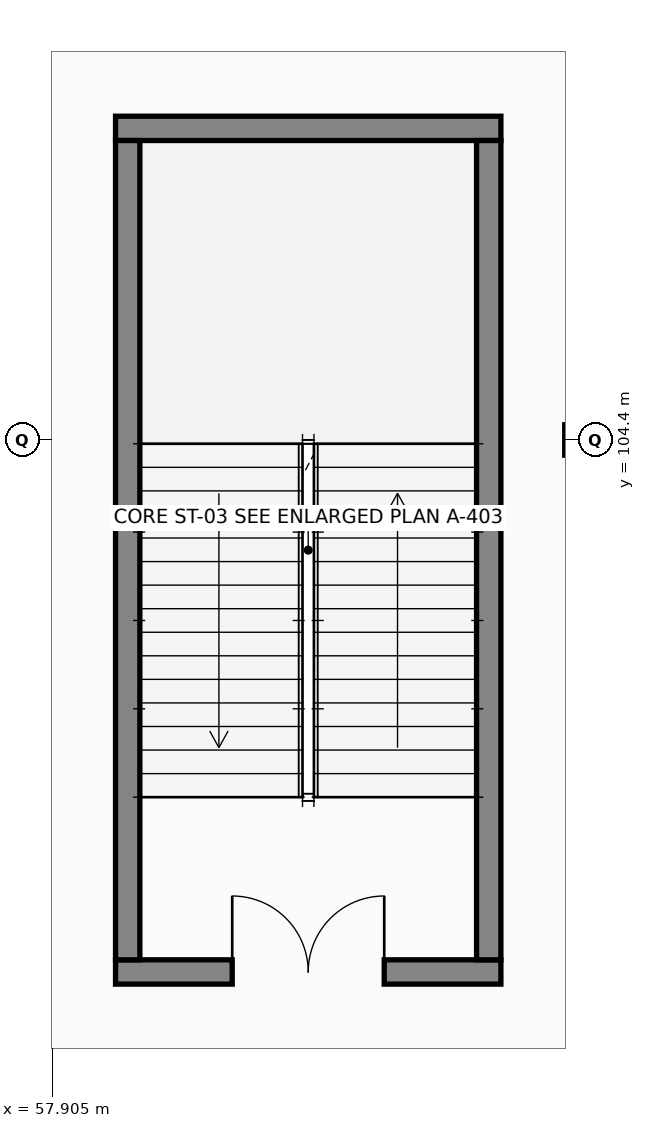
"""IFC4 building model, lengths in metres.
Left out: names, types, materials, properties, quantities, classifications, styles, units other than length and angle.
Written with IfcOpenShell. Run it as: python <this file> out.ifc"""

import sys

from ifc_helpers import new_model, si_unit, direction, frame, frame_2d, origin, place, context, subcontext, project, spatial, rectangle, extrude, element, fill, save


model = new_model("IFC4")
c1 = context("Model", 3, precision=1e-05, world=origin(), true_north=direction((0.0, 1.0)))
c2 = subcontext(c1, "Body", "Model", "MODEL_VIEW")
j1 = project(units=[si_unit("LENGTHUNIT", "METRE"), si_unit("PLANEANGLEUNIT", "RADIAN")], contexts=[c1])
p1 = place(None, origin())
s1 = spatial("IfcSite", under=j1, at=p1, CompositionType="ELEMENT")
p2 = place(p1, origin())
s2 = spatial("IfcBuilding", under=s1, at=p2, CompositionType="ELEMENT")
p3 = place(p2, frame((0.0, 0.0, 9.6)))
s3 = spatial("IfcBuildingStorey", under=s2, at=p3, CompositionType="ELEMENT", Elevation=9.6)
p4 = place(p3, frame((58.74, 97.4, 0.0), z_axis=(0.0, 0.0, 1.0), x_axis=(1.0, 0.0, 0.0)))
e1 = element("IfcWall", 1, at=p4, inside=s3, PredefinedType="SHEAR", context=c2, shape_type="SweptSolid", body=[
    extrude(rectangle(XDim=5.07, YDim=0.32, at=frame_2d((2.535, 0.0))), origin(), (0.0, 0.0, 1.0), 4.56),
])
p5 = place(p4, frame((1.535, 0.0, 0.0)))
e2 = element("IfcOpeningElement", 2, at=p5, cuts=e1, PredefinedType="OPENING", context=c2, shape_type="SweptSolid", body=[
    extrude(rectangle(XDim=2.0, YDim=2.15, at=frame_2d((1.0, 1.075))), frame((0.0, 0.17, 0.0), z_axis=(0.0, -1.0, 0.0), x_axis=(1.0, 0.0, 0.0)), (0.0, 0.0, 1.0), 0.34),
])
p6 = place(p3, frame((58.74, 108.5, 0.0), z_axis=(0.0, 0.0, 1.0), x_axis=(1.0, 0.0, 0.0)))
e3 = element("IfcWall", 3, at=p6, inside=s3, PredefinedType="SHEAR", context=c2, shape_type="SweptSolid", body=[
    extrude(rectangle(XDim=5.07, YDim=0.32, at=frame_2d((2.535, 0.0))), origin(), (0.0, 0.0, 1.0), 4.56),
])
for number, where, z_axis, x_axis in (
    (4, (58.9, 97.56, 0.0), (0.0, 0.0, 1.0), (0.0, 1.0, 0.0)),
    (5, (63.65, 97.56, 0.0), (0.0, 0.0, 1.0), (0.0, 1.0, 0.0)),
):
    element("IfcWall", number, at=place(p3, frame(where, z_axis=z_axis, x_axis=x_axis)), inside=s3, PredefinedType="SHEAR", context=c2, shape_type="SweptSolid", body=[
        extrude(rectangle(XDim=10.78, YDim=0.32, at=frame_2d((5.39, 0.0))), origin(), (0.0, 0.0, 1.0), 4.56),
    ])
p7 = place(p5, origin())
e6 = element("IfcDoor", 6, at=p7, inside=s3, OperationType="DOUBLE_DOOR_SINGLE_SWING", PredefinedType="DOOR", context=c2, shape_type="SweptSolid", body=[
    extrude(rectangle(XDim=2.0, YDim=2.15, at=frame_2d((1.0, 1.075))), frame((0.0, 0.025, 0.0), z_axis=(0.0, -1.0, 0.0), x_axis=(1.0, 0.0, 0.0)), (0.0, 0.0, 1.0), 0.05),
])
fill(e2, e6)
save(model, sys.argv[1])
